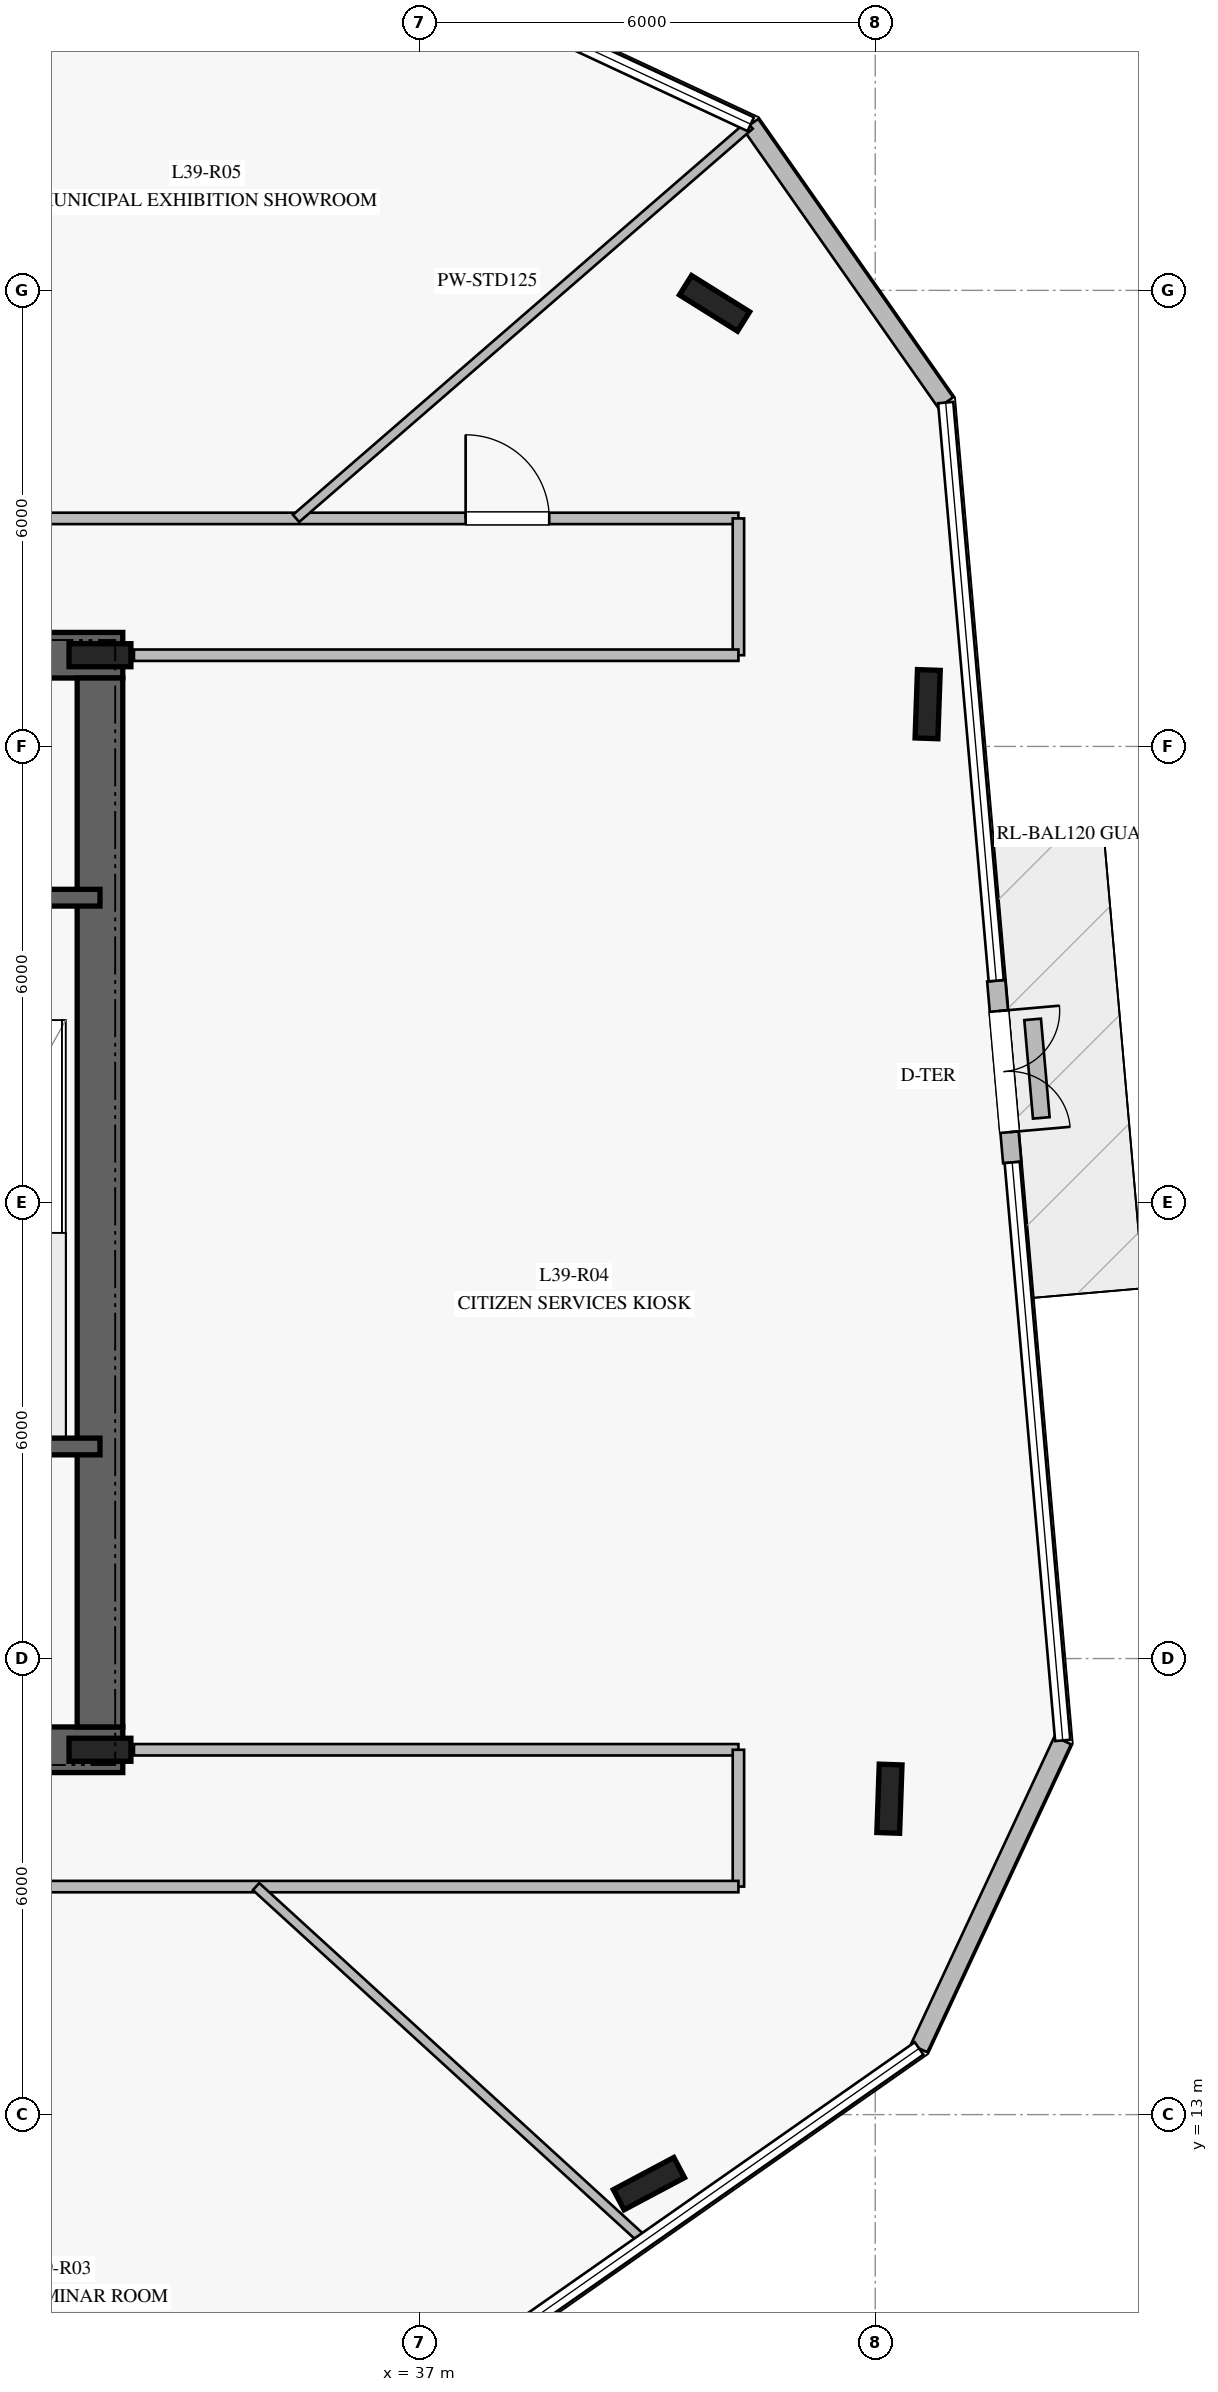
"""IFC4 building model, lengths in metres.
Left out: names, types, materials, properties, quantities, classifications, styles, units other than length and angle.
Written with IfcOpenShell. Run it as: python <this file> out.ifc"""

import sys

from ifc_helpers import new_model, si_unit, direction, frame, frame_2d, origin, origin_2d, place, context, subcontext, project, spatial, rectangle, i_section, extrude, element, fill, save


model = new_model("IFC4")
c1 = context("Model", 3, precision=1e-05, world=origin(), true_north=direction((0.0, 1.0)))
c2 = subcontext(c1, "Body", "Model", "MODEL_VIEW")
j1 = project(units=[si_unit("LENGTHUNIT", "METRE"), si_unit("PLANEANGLEUNIT", "RADIAN")], contexts=[c1])
p1 = place(None, origin())
s1 = spatial("IfcSite", under=j1, at=p1, CompositionType="ELEMENT")
p2 = place(p1, origin())
s2 = spatial("IfcBuilding", under=s1, at=p2, CompositionType="ELEMENT")
p3 = place(p2, frame((0.0, 0.0, 162.4)))
s3 = spatial("IfcBuildingStorey", under=s2, at=p3, CompositionType="ELEMENT", Elevation=162.4)
p4 = place(p3, frame((16.9, 17.8, 0.0), z_axis=(0.0, 0.0, 1.0), x_axis=(1.0, 0.0, 0.0)))
e1 = element("IfcWall", 1, at=p4, inside=s3, PredefinedType="SHEAR", context=c2, shape_type="SweptSolid", body=[
    extrude(rectangle(XDim=16.2, YDim=0.6, at=frame_2d((8.1, 0.0))), origin(), (0.0, 0.0, 1.0), 3.76),
])
p5 = place(p4, frame((5.05, 0.0, 0.0)))
e2 = element("IfcOpeningElement", 2, at=p5, cuts=e1, PredefinedType="OPENING", context=c2, shape_type="SweptSolid", body=[
    extrude(rectangle(XDim=1.2, YDim=2.25, at=frame_2d((0.6, 1.125))), frame((0.0, 0.31, 0.0), z_axis=(0.0, -1.0, 0.0), x_axis=(1.0, 0.0, 0.0)), (0.0, 0.0, 1.0), 0.62),
])
p6 = place(p4, frame((14.0, 0.0, 0.0)))
e3 = element("IfcOpeningElement", 3, at=p6, cuts=e1, PredefinedType="OPENING", context=c2, shape_type="SweptSolid", body=[
    extrude(rectangle(XDim=0.9, YDim=2.1, at=frame_2d((0.45, 1.05))), frame((0.0, 0.31, 0.0), z_axis=(0.0, -1.0, 0.0), x_axis=(1.0, 0.0, 0.0)), (0.0, 0.0, 1.0), 0.62),
])
p7 = place(p4, frame((9.25, 0.0, 0.0)))
e4 = element("IfcOpeningElement", 4, at=p7, cuts=e1, PredefinedType="OPENING", context=c2, shape_type="SweptSolid", body=[
    extrude(rectangle(XDim=1.1, YDim=2.2, at=frame_2d((0.55, 1.1))), frame((0.0, 0.31, 0.0), z_axis=(0.0, -1.0, 0.0), x_axis=(1.0, 0.0, 0.0)), (0.0, 0.0, 1.0), 0.62),
])
p8 = place(p3, frame((33.1, 32.2, 0.0), z_axis=(0.0, 0.0, 1.0), x_axis=(-1.0, 0.0, 0.0)))
e5 = element("IfcWall", 5, at=p8, inside=s3, PredefinedType="SHEAR", context=c2, shape_type="SweptSolid", body=[
    extrude(rectangle(XDim=16.2, YDim=0.6, at=frame_2d((8.1, 0.0))), origin(), (0.0, 0.0, 1.0), 3.76),
])
p9 = place(p8, frame((5.05, 0.0, 0.0)))
e6 = element("IfcOpeningElement", 6, at=p9, cuts=e5, PredefinedType="OPENING", context=c2, shape_type="SweptSolid", body=[
    extrude(rectangle(XDim=1.2, YDim=2.25, at=frame_2d((0.6, 1.125))), frame((0.0, 0.31, 0.0), z_axis=(0.0, -1.0, 0.0), x_axis=(1.0, 0.0, 0.0)), (0.0, 0.0, 1.0), 0.62),
])
p10 = place(p8, frame((11.85, 0.0, 0.0)))
e7 = element("IfcOpeningElement", 7, at=p10, cuts=e5, PredefinedType="OPENING", context=c2, shape_type="SweptSolid", body=[
    extrude(rectangle(XDim=1.1, YDim=2.2, at=frame_2d((0.55, 1.1))), frame((0.0, 0.31, 0.0), z_axis=(0.0, -1.0, 0.0), x_axis=(1.0, 0.0, 0.0)), (0.0, 0.0, 1.0), 0.62),
])
p11 = place(p8, frame((9.875, 0.0, 0.0)))
e8 = element("IfcOpeningElement", 8, at=p11, cuts=e5, PredefinedType="OPENING", context=c2, shape_type="SweptSolid", body=[
    extrude(rectangle(XDim=1.1, YDim=2.2, at=frame_2d((0.55, 1.1))), frame((0.0, 0.31, 0.0), z_axis=(0.0, -1.0, 0.0), x_axis=(1.0, 0.0, 0.0)), (0.0, 0.0, 1.0), 0.62),
])
p12 = place(p8, frame((7.9, 0.0, 0.0)))
e9 = element("IfcOpeningElement", 9, at=p12, cuts=e5, PredefinedType="OPENING", context=c2, shape_type="SweptSolid", body=[
    extrude(rectangle(XDim=1.1, YDim=2.2, at=frame_2d((0.55, 1.1))), frame((0.0, 0.31, 0.0), z_axis=(0.0, -1.0, 0.0), x_axis=(1.0, 0.0, 0.0)), (0.0, 0.0, 1.0), 0.62),
])
p13 = place(p3, frame((32.8, 18.1, 0.0), z_axis=(0.0, 0.0, 1.0), x_axis=(0.0, 1.0, 0.0)))
e10 = element("IfcWall", 10, at=p13, inside=s3, PredefinedType="SHEAR", context=c2, shape_type="SweptSolid", body=[
    extrude(rectangle(XDim=13.8, YDim=0.6, at=frame_2d((6.9, 0.0))), origin(), (0.0, 0.0, 1.0), 3.76),
])
for number, where, z_axis, x_axis in (
    (11, (32.8, 17.8, 0.0), (0.0, 0.0, 1.0), (1.0, 0.0, 0.0)),
    (12, (32.8, 32.2, 0.0), (0.0, 0.0, 1.0), (1.0, 0.0, 0.0)),
):
    element("IfcColumn", number, at=place(p3, frame(where, z_axis=z_axis, x_axis=x_axis)), inside=s3, PredefinedType="COLUMN", context=c2, shape_type="SweptSolid", body=[
        extrude(i_section(OverallWidth=0.303, OverallDepth=0.814, WebThickness=0.021, FlangeThickness=0.04, at=origin_2d()), origin(), (0.0, 0.0, 1.0), 4.0),
    ])
for number, where, z_axis, x_axis in (
    (13, (29.08, 21.79, 0.0), (0.0, 0.0, 1.0), (1.0, 0.0, 0.0)),
    (14, (29.08, 29.01, 0.0), (0.0, 0.0, 1.0), (1.0, 0.0, 0.0)),
):
    element("IfcWall", number, at=place(p3, frame(where, z_axis=z_axis, x_axis=x_axis)), inside=s3, PredefinedType="SOLIDWALL", context=c2, shape_type="SweptSolid", body=[
        extrude(rectangle(XDim=3.72, YDim=0.22, at=frame_2d((1.86, 0.0))), origin(), (0.0, 0.0, 1.0), 3.76),
    ])
for number, where, z_axis, x_axis in (
    (15, (40.886, 36.829, 0.0), (0.0, 0.0, 1.0), (-0.848, 0.53, 0.0)),
    (16, (40.023, 12.092, 0.0), (0.0, 0.0, 1.0), (0.883, 0.469, 0.0)),
    (17, (43.187, 17.156, 0.0), (0.0, 0.0, 1.0), (0.035, 0.999, 0.0)),
    (18, (43.69, 31.556, 0.0), (0.0, 0.0, 1.0), (0.035, 0.999, 0.0)),
):
    element("IfcColumn", number, at=place(p3, frame(where, z_axis=z_axis, x_axis=x_axis)), inside=s3, PredefinedType="COLUMN", context=c2, shape_type="SweptSolid", body=[
        extrude(i_section(OverallWidth=0.3, OverallDepth=0.9, WebThickness=0.019, FlangeThickness=0.035, at=origin_2d()), origin(), (0.0, 0.0, 1.0), 4.0),
    ])
p14 = place(p3, frame((43.577, 13.871, 0.0), z_axis=(0.0, 0.0, 1.0), x_axis=(0.422738987368, 0.906251481962, 0.0)))
e19 = element("IfcWall", 19, at=p14, inside=s3, PredefinedType="STANDARD", context=c2, shape_type="SweptSolid", body=[
    extrude(rectangle(XDim=4.471, YDim=0.24, at=frame_2d((2.236, 0.0))), origin(), (0.0, 0.0, 1.0), 3.76),
])
p15 = place(p3, frame((44.802, 25.527, 0.0), z_axis=(0.0, 0.0, 1.0), x_axis=(-0.087481150874, 0.996166175014, 0.0)))
e20 = element("IfcWall", 20, at=p15, inside=s3, PredefinedType="STANDARD", context=c2, shape_type="SweptSolid", body=[
    extrude(rectangle(XDim=2.4, YDim=0.24, at=frame_2d((1.2, 0.0))), origin(), (0.0, 0.0, 1.0), 3.76),
])
p16 = place(p15, frame((0.4, 0.0, 0.0)))
e21 = element("IfcOpeningElement", 21, at=p16, cuts=e20, PredefinedType="OPENING", context=c2, shape_type="SweptSolid", body=[
    extrude(rectangle(XDim=1.6, YDim=2.25, at=frame_2d((0.8, 1.125))), frame((0.0, 0.13, 0.0), z_axis=(0.0, -1.0, 0.0), x_axis=(1.0, 0.0, 0.0)), (0.0, 0.0, 1.0), 0.26),
])
p17 = place(p3, frame((43.927, 35.524, 0.0), z_axis=(0.0, 0.0, 1.0), x_axis=(-0.57368221041, 0.819077970317, 0.0)))
e22 = element("IfcWall", 22, at=p17, inside=s3, PredefinedType="STANDARD", context=c2, shape_type="SweptSolid", body=[
    extrude(rectangle(XDim=4.471, YDim=0.24, at=frame_2d((2.235, 0.0))), origin(), (0.0, 0.0, 1.0), 3.76),
])
p18 = place(p3, frame((45.185, 26.113, 0.0), z_axis=(0.0, 0.0, 1.0), x_axis=(-0.087641862602, 0.996152048595, 0.0)))
e23 = element("IfcWall", 23, at=p18, inside=s3, PredefinedType="USERDEFINED", context=c2, shape_type="SweptSolid", body=[
    extrude(rectangle(XDim=1.301, YDim=0.22, at=frame_2d((0.65, 0.0))), origin(), (0.0, 0.0, 1.0), 0.4),
])
p19 = place(p3, frame((25.95, 34.0, 0.0), z_axis=(0.0, 0.0, 1.0), x_axis=(1.0, 0.0, 0.0)))
e24 = element("IfcWall", 24, at=p19, inside=s3, PredefinedType="PARTITIONING", context=c2, shape_type="SweptSolid", body=[
    extrude(rectangle(XDim=15.25, YDim=0.15, at=frame_2d((7.625, 0.0))), origin(), (0.0, 0.0, 1.0), 3.21),
])
p20 = place(p19, frame((11.661, 0.0, 0.0)))
e25 = element("IfcOpeningElement", 25, at=p20, cuts=e24, PredefinedType="OPENING", context=c2, shape_type="SweptSolid", body=[
    extrude(rectangle(XDim=1.1, YDim=2.2, at=frame_2d((0.55, 1.1))), frame((0.0, 0.085, 0.0), z_axis=(0.0, -1.0, 0.0), x_axis=(1.0, 0.0, 0.0)), (0.0, 0.0, 1.0), 0.17),
])
p21 = place(p19, frame((5.096, 0.0, 0.0)))
e26 = element("IfcOpeningElement", 26, at=p21, cuts=e24, PredefinedType="OPENING", context=c2, shape_type="SweptSolid", body=[
    extrude(rectangle(XDim=1.1, YDim=2.2, at=frame_2d((0.55, 1.1))), frame((0.0, 0.085, 0.0), z_axis=(0.0, -1.0, 0.0), x_axis=(1.0, 0.0, 0.0)), (0.0, 0.0, 1.0), 0.17),
])
p22 = place(p3, frame((41.2, 34.0, 0.0), z_axis=(0.0, 0.0, 1.0), x_axis=(0.0, -1.0, 0.0)))
e27 = element("IfcWall", 27, at=p22, inside=s3, PredefinedType="PARTITIONING", context=c2, shape_type="SweptSolid", body=[
    extrude(rectangle(XDim=1.8, YDim=0.15, at=frame_2d((0.9, 0.0))), origin(), (0.0, 0.0, 1.0), 3.76),
])
p23 = place(p3, frame((41.2, 32.2, 0.0), z_axis=(0.0, 0.0, 1.0), x_axis=(-1.0, 0.0, 0.0)))
e28 = element("IfcWall", 28, at=p23, inside=s3, PredefinedType="PARTITIONING", context=c2, shape_type="SweptSolid", body=[
    extrude(rectangle(XDim=7.953, YDim=0.15, at=frame_2d((3.977, 0.0))), origin(), (0.0, 0.0, 1.0), 3.21),
])
p24 = place(p3, frame((33.247, 17.8, 0.0), z_axis=(0.0, 0.0, 1.0), x_axis=(1.0, 0.0, 0.0)))
e29 = element("IfcWall", 29, at=p24, inside=s3, PredefinedType="PARTITIONING", context=c2, shape_type="SweptSolid", body=[
    extrude(rectangle(XDim=7.953, YDim=0.15, at=frame_2d((3.977, 0.0))), origin(), (0.0, 0.0, 1.0), 3.05),
])
p25 = place(p3, frame((41.2, 17.8, 0.0), z_axis=(0.0, 0.0, 1.0), x_axis=(0.0, -1.0, 0.0)))
e30 = element("IfcWall", 30, at=p25, inside=s3, PredefinedType="PARTITIONING", context=c2, shape_type="SweptSolid", body=[
    extrude(rectangle(XDim=1.8, YDim=0.15, at=frame_2d((0.9, 0.0))), origin(), (0.0, 0.0, 1.0), 3.21),
])
p26 = place(p3, frame((41.2, 16.0, 0.0), z_axis=(0.0, 0.0, 1.0), x_axis=(-1.0, 0.0, 0.0)))
e31 = element("IfcWall", 31, at=p26, inside=s3, PredefinedType="PARTITIONING", context=c2, shape_type="SweptSolid", body=[
    extrude(rectangle(XDim=15.25, YDim=0.15, at=frame_2d((7.625, 0.0))), origin(), (0.0, 0.0, 1.0), 3.21),
])
p27 = place(p26, frame((9.792, 0.0, 0.0)))
e32 = element("IfcOpeningElement", 32, at=p27, cuts=e31, PredefinedType="OPENING", context=c2, shape_type="SweptSolid", body=[
    extrude(rectangle(XDim=1.1, YDim=2.2, at=frame_2d((0.55, 1.1))), frame((0.0, 0.085, 0.0), z_axis=(0.0, -1.0, 0.0), x_axis=(1.0, 0.0, 0.0)), (0.0, 0.0, 1.0), 0.17),
])
p28 = place(p3, frame((35.38, 34.0, 0.0), z_axis=(0.0, 0.0, 1.0), x_axis=(0.755576888345, 0.655059971147, 0.0)))
e33 = element("IfcWall", 33, at=p28, inside=s3, PredefinedType="PARTITIONING", context=c2, shape_type="SweptSolid", body=[
    extrude(rectangle(XDim=7.899, YDim=0.125, at=frame_2d((3.949, 0.0))), origin(), (0.0, 0.0, 1.0), 3.16),
])
p29 = place(p3, frame((34.854, 16.0, 0.0), z_axis=(0.0, 0.0, 1.0), x_axis=(0.738368219991, -0.674397784477, 0.0)))
e34 = element("IfcWall", 34, at=p29, inside=s3, PredefinedType="PARTITIONING", context=c2, shape_type="SweptSolid", body=[
    extrude(rectangle(XDim=6.896, YDim=0.125, at=frame_2d((3.448, 0.0))), origin(), (0.0, 0.0, 1.0), 3.02),
])
p30 = place(p16, frame((1.6, 0.0, 0.0), z_axis=(0.0, 0.0, 1.0), x_axis=(-1.0, 0.0, 0.0)))
e35 = element("IfcDoor", 35, at=p30, inside=s3, OperationType="DOUBLE_DOOR_SINGLE_SWING", PredefinedType="DOOR", context=c2, shape_type="SweptSolid", body=[
    extrude(rectangle(XDim=1.6, YDim=2.25, at=frame_2d((0.8, 1.125))), frame((0.0, 0.025, 0.0), z_axis=(0.0, -1.0, 0.0), x_axis=(1.0, 0.0, 0.0)), (0.0, 0.0, 1.0), 0.05),
])
fill(e21, e35)
p31 = place(p20, origin())
e36 = element("IfcDoor", 36, at=p31, inside=s3, OperationType="SINGLE_SWING_LEFT", PredefinedType="DOOR", context=c2, shape_type="SweptSolid", body=[
    extrude(rectangle(XDim=1.1, YDim=2.2, at=frame_2d((0.55, 1.1))), frame((0.0, 0.025, 0.0), z_axis=(0.0, -1.0, 0.0), x_axis=(1.0, 0.0, 0.0)), (0.0, 0.0, 1.0), 0.05),
])
fill(e25, e36)
save(model, sys.argv[1])
